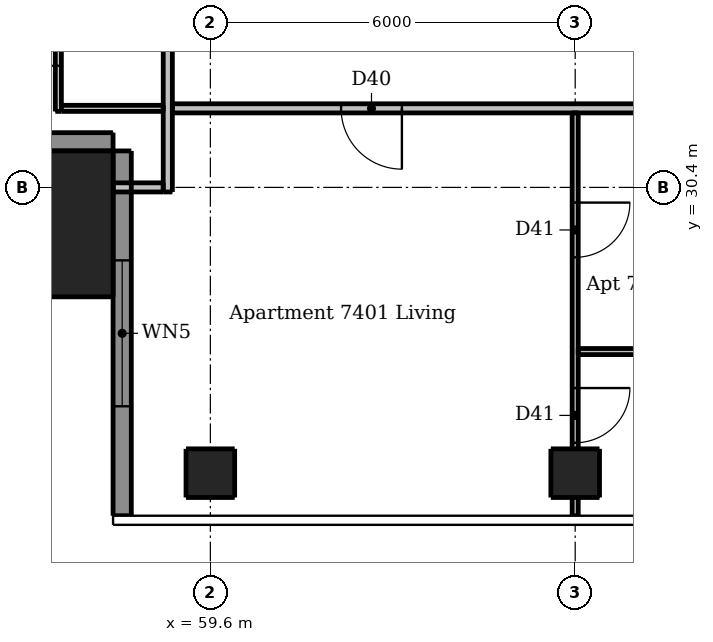
"""IFC4 building model, lengths in metres.
Left out: names, types, materials, properties, quantities, classifications, styles, units other than length and angle.
Written with IfcOpenShell. Run it as: python <this file> out.ifc"""

import sys

from ifc_helpers import new_model, si_unit, direction, frame, frame_2d, origin, origin_2d, place, context, subcontext, project, spatial, rectangle, extrude, element, fill, save


model = new_model("IFC4")
c1 = context("Model", 3, precision=1e-05, world=origin(), true_north=direction((0.0, 1.0)))
c2 = subcontext(c1, "Body", "Model", "MODEL_VIEW")
j1 = project(units=[si_unit("LENGTHUNIT", "METRE"), si_unit("PLANEANGLEUNIT", "RADIAN")], contexts=[c1])
p1 = place(None, origin())
s1 = spatial("IfcSite", under=j1, at=p1, CompositionType="ELEMENT")
p2 = place(p1, origin())
s2 = spatial("IfcBuilding", under=s1, at=p2, CompositionType="ELEMENT")
p3 = place(p2, frame((0.0, 0.0, 275.2)))
s3 = spatial("IfcBuildingStorey", under=s2, at=p3, CompositionType="ELEMENT", Elevation=275.2)
for number, where, z_axis, x_axis in (
    (1, (59.6, 25.7, 0.0), (0.0, 0.0, 1.0), (1.0, 0.0, 0.0)),
    (2, (65.6, 25.7, 0.0), (0.0, 0.0, 1.0), (1.0, 0.0, 0.0)),
):
    element("IfcColumn", number, at=place(p3, frame(where, z_axis=z_axis, x_axis=x_axis)), inside=s3, PredefinedType="COLUMN", context=c2, shape_type="SweptSolid", body=[
        extrude(rectangle(XDim=0.8, YDim=0.8, at=origin_2d()), origin(), (0.0, 0.0, 1.0), 3.05),
    ])
p4 = place(p3, frame((56.8, 29.8, 0.0), z_axis=(0.0, 0.0, 1.0), x_axis=(1.0, 0.0, 0.0)))
e3 = element("IfcColumn", 3, at=p4, inside=s3, PredefinedType="COLUMN", context=c2, shape_type="SweptSolid", body=[
    extrude(rectangle(XDim=2.4, YDim=2.4, at=origin_2d()), origin(), (0.0, 0.0, 1.0), 3.3),
])
p5 = place(p3, frame((53.0, 31.15, 0.0), z_axis=(0.0, 0.0, 1.0), x_axis=(1.0, 0.0, 0.0)))
e4 = element("IfcWall", 4, at=p5, inside=s3, PredefinedType="SOLIDWALL", context=c2, shape_type="SweptSolid", body=[
    extrude(rectangle(XDim=5.0, YDim=0.3, at=frame_2d((2.5, 0.0))), origin(), (0.0, 0.0, 1.0), 3.05),
])
p6 = place(p3, frame((58.15, 31.0, 0.0), z_axis=(0.0, 0.0, 1.0), x_axis=(0.0, -1.0, 0.0)))
e5 = element("IfcWall", 5, at=p6, inside=s3, PredefinedType="SOLIDWALL", context=c2, shape_type="SweptSolid", body=[
    extrude(rectangle(XDim=6.0, YDim=0.3, at=frame_2d((3.0, 0.0))), origin(), (0.0, 0.0, 1.0), 3.05),
])
p7 = place(p6, frame((1.8, 0.0, 0.15)))
e6 = element("IfcOpeningElement", 6, at=p7, cuts=e5, PredefinedType="OPENING", context=c2, shape_type="SweptSolid", body=[
    extrude(rectangle(XDim=2.4, YDim=2.1, at=frame_2d((1.2, 1.05))), frame((0.0, 0.16, 0.0), z_axis=(0.0, -1.0, 0.0), x_axis=(1.0, 0.0, 0.0)), (0.0, 0.0, 1.0), 0.32),
])
p8 = place(p3, frame((57.1, 31.65, 0.0), z_axis=(0.0, 0.0, 1.0), x_axis=(0.0, 1.0, 0.0)))
e7 = element("IfcWall", 7, at=p8, inside=s3, PredefinedType="PARTITIONING", context=c2, shape_type="SweptSolid", body=[
    extrude(rectangle(XDim=16.675, YDim=0.1, at=frame_2d((8.337, 0.0))), origin(), (0.0, 0.0, 1.0), 3.05),
])
p9 = place(p8, frame((11.2, 0.0, 0.0)))
e8 = element("IfcOpeningElement", 8, at=p9, cuts=e7, PredefinedType="OPENING", context=c2, shape_type="SweptSolid", body=[
    extrude(rectangle(XDim=0.9, YDim=2.1, at=frame_2d((0.45, 1.05))), frame((0.0, 0.06, 0.0), z_axis=(0.0, -1.0, 0.0), x_axis=(1.0, 0.0, 0.0)), (0.0, 0.0, 1.0), 0.12),
])
p10 = place(p8, frame((15.1, 0.0, 0.0)))
e9 = element("IfcOpeningElement", 9, at=p10, cuts=e7, PredefinedType="OPENING", context=c2, shape_type="SweptSolid", body=[
    extrude(rectangle(XDim=0.9, YDim=2.1, at=frame_2d((0.45, 1.05))), frame((0.0, 0.06, 0.0), z_axis=(0.0, -1.0, 0.0), x_axis=(1.0, 0.0, 0.0)), (0.0, 0.0, 1.0), 0.12),
])
p11 = place(p8, frame((13.0, 0.0, 0.0)))
e10 = element("IfcOpeningElement", 10, at=p11, cuts=e7, PredefinedType="OPENING", context=c2, shape_type="SweptSolid", body=[
    extrude(rectangle(XDim=0.9, YDim=2.1, at=frame_2d((0.45, 1.05))), frame((0.0, 0.06, 0.0), z_axis=(0.0, -1.0, 0.0), x_axis=(1.0, 0.0, 0.0)), (0.0, 0.0, 1.0), 0.12),
])
p12 = place(p8, frame((0.75, 0.0, 0.0)))
e11 = element("IfcOpeningElement", 11, at=p12, cuts=e7, PredefinedType="OPENING", context=c2, shape_type="SweptSolid", body=[
    extrude(rectangle(XDim=0.9, YDim=2.1, at=frame_2d((0.45, 1.05))), frame((0.0, 0.06, 0.0), z_axis=(0.0, -1.0, 0.0), x_axis=(1.0, 0.0, 0.0)), (0.0, 0.0, 1.0), 0.12),
])
p13 = place(p8, frame((6.1, 0.0, 0.0)))
e12 = element("IfcOpeningElement", 12, at=p13, cuts=e7, PredefinedType="OPENING", context=c2, shape_type="SweptSolid", body=[
    extrude(rectangle(XDim=0.9, YDim=2.1, at=frame_2d((0.45, 1.05))), frame((0.0, 0.06, 0.0), z_axis=(0.0, -1.0, 0.0), x_axis=(1.0, 0.0, 0.0)), (0.0, 0.0, 1.0), 0.12),
])
p14 = place(p8, frame((3.15, 0.0, 0.0)))
e13 = element("IfcOpeningElement", 13, at=p14, cuts=e7, PredefinedType="OPENING", context=c2, shape_type="SweptSolid", body=[
    extrude(rectangle(XDim=0.8, YDim=2.1, at=frame_2d((0.4, 1.05))), frame((0.0, 0.06, 0.0), z_axis=(0.0, -1.0, 0.0), x_axis=(1.0, 0.0, 0.0)), (0.0, 0.0, 1.0), 0.12),
])
p15 = place(p8, frame((9.15, 0.0, 0.0)))
e14 = element("IfcOpeningElement", 14, at=p15, cuts=e7, PredefinedType="OPENING", context=c2, shape_type="SweptSolid", body=[
    extrude(rectangle(XDim=0.8, YDim=2.1, at=frame_2d((0.4, 1.05))), frame((0.0, 0.06, 0.0), z_axis=(0.0, -1.0, 0.0), x_axis=(1.0, 0.0, 0.0)), (0.0, 0.0, 1.0), 0.12),
])
p16 = place(p3, frame((65.6, 31.625, 0.0), z_axis=(0.0, 0.0, 1.0), x_axis=(0.0, -1.0, 0.0)))
e15 = element("IfcWall", 15, at=p16, inside=s3, PredefinedType="PARTITIONING", context=c2, shape_type="SweptSolid", body=[
    extrude(rectangle(XDim=6.625, YDim=0.1, at=frame_2d((3.312, 0.0))), origin(), (0.0, 0.0, 1.0), 2.589),
])
p17 = place(p16, frame((1.475, 0.0, 0.0)))
e16 = element("IfcOpeningElement", 16, at=p17, cuts=e15, PredefinedType="OPENING", context=c2, shape_type="SweptSolid", body=[
    extrude(rectangle(XDim=0.9, YDim=2.1, at=frame_2d((0.45, 1.05))), frame((0.0, 0.06, 0.0), z_axis=(0.0, -1.0, 0.0), x_axis=(1.0, 0.0, 0.0)), (0.0, 0.0, 1.0), 0.12),
])
p18 = place(p16, frame((4.525, 0.0, 0.0)))
e17 = element("IfcOpeningElement", 17, at=p18, cuts=e15, PredefinedType="OPENING", context=c2, shape_type="SweptSolid", body=[
    extrude(rectangle(XDim=0.9, YDim=2.1, at=frame_2d((0.45, 1.05))), frame((0.0, 0.06, 0.0), z_axis=(0.0, -1.0, 0.0), x_axis=(1.0, 0.0, 0.0)), (0.0, 0.0, 1.0), 0.12),
])
p19 = place(p3, frame((57.15, 31.7, 0.0), z_axis=(0.0, 0.0, 1.0), x_axis=(1.0, 0.0, 0.0)))
e18 = element("IfcWall", 18, at=p19, inside=s3, PredefinedType="PARTITIONING", context=c2, shape_type="SweptSolid", body=[
    extrude(rectangle(XDim=1.675, YDim=0.1, at=frame_2d((0.837, 0.0))), origin(), (0.0, 0.0, 1.0), 3.05),
])
p20 = place(p3, frame((65.65, 27.7, 0.0), z_axis=(0.0, 0.0, 1.0), x_axis=(1.0, 0.0, 0.0)))
e19 = element("IfcWall", 19, at=p20, inside=s3, PredefinedType="PARTITIONING", context=c2, shape_type="SweptSolid", body=[
    extrude(rectangle(XDim=5.875, YDim=0.1, at=frame_2d((2.938, 0.0))), origin(), (0.0, 0.0, 1.0), 3.05),
])
p21 = place(p20, frame((3.75, 0.0, 0.0)))
e20 = element("IfcOpeningElement", 20, at=p21, cuts=e19, PredefinedType="OPENING", context=c2, shape_type="SweptSolid", body=[
    extrude(rectangle(XDim=0.8, YDim=2.1, at=frame_2d((0.4, 1.05))), frame((0.0, 0.06, 0.0), z_axis=(0.0, -1.0, 0.0), x_axis=(1.0, 0.0, 0.0)), (0.0, 0.0, 1.0), 0.12),
])
p22 = place(p3, frame((58.9, 30.325, 0.0), z_axis=(0.0, 0.0, 1.0), x_axis=(0.0, 1.0, 0.0)))
e21 = element("IfcWall", 21, at=p22, inside=s3, PredefinedType="PARTITIONING", context=c2, shape_type="SweptSolid", body=[
    extrude(rectangle(XDim=30.85, YDim=0.15, at=frame_2d((15.425, 0.0))), origin(), (0.0, 0.0, 1.0), 3.05),
])
p23 = place(p22, frame((9.225, 0.0, 0.0)))
e22 = element("IfcOpeningElement", 22, at=p23, cuts=e21, PredefinedType="OPENING", context=c2, shape_type="SweptSolid", body=[
    extrude(rectangle(XDim=1.0, YDim=2.1, at=frame_2d((0.5, 1.05))), frame((0.0, 0.085, 0.0), z_axis=(0.0, -1.0, 0.0), x_axis=(1.0, 0.0, 0.0)), (0.0, 0.0, 1.0), 0.17),
])
p24 = place(p22, frame((26.925, 0.0, 0.0)))
e23 = element("IfcOpeningElement", 23, at=p24, cuts=e21, PredefinedType="OPENING", context=c2, shape_type="SweptSolid", body=[
    extrude(rectangle(XDim=1.0, YDim=2.1, at=frame_2d((0.5, 1.05))), frame((0.0, 0.085, 0.0), z_axis=(0.0, -1.0, 0.0), x_axis=(1.0, 0.0, 0.0)), (0.0, 0.0, 1.0), 0.17),
])
p25 = place(p3, frame((89.525, 31.7, 0.0), z_axis=(0.0, 0.0, 1.0), x_axis=(-1.0, 0.0, 0.0)))
e24 = element("IfcWall", 24, at=p25, inside=s3, PredefinedType="PARTITIONING", context=c2, shape_type="SweptSolid", body=[
    extrude(rectangle(XDim=30.55, YDim=0.15, at=frame_2d((15.275, 0.0))), origin(), (0.0, 0.0, 1.0), 3.05),
])
p26 = place(p25, frame((26.775, 0.0, 0.0)))
e25 = element("IfcOpeningElement", 25, at=p26, cuts=e24, PredefinedType="OPENING", context=c2, shape_type="SweptSolid", body=[
    extrude(rectangle(XDim=1.0, YDim=2.1, at=frame_2d((0.5, 1.05))), frame((0.0, 0.085, 0.0), z_axis=(0.0, -1.0, 0.0), x_axis=(1.0, 0.0, 0.0)), (0.0, 0.0, 1.0), 0.17),
])
p27 = place(p25, frame((9.363, 0.0, 0.0)))
e26 = element("IfcOpeningElement", 26, at=p27, cuts=e24, PredefinedType="OPENING", context=c2, shape_type="SweptSolid", body=[
    extrude(rectangle(XDim=1.0, YDim=2.1, at=frame_2d((0.5, 1.05))), frame((0.0, 0.085, 0.0), z_axis=(0.0, -1.0, 0.0), x_axis=(1.0, 0.0, 0.0)), (0.0, 0.0, 1.0), 0.17),
])
p28 = place(p3, frame((58.0, 30.4, 0.0), z_axis=(0.0, 0.0, 1.0), x_axis=(1.0, 0.0, 0.0)))
e27 = element("IfcWall", 27, at=p28, inside=s3, PredefinedType="PARTITIONING", context=c2, shape_type="SweptSolid", body=[
    extrude(rectangle(XDim=0.825, YDim=0.15, at=frame_2d((0.413, 0.0))), origin(), (0.0, 0.0, 1.0), 3.05),
])
p29 = place(p7, origin())
e28 = element("IfcWindow", 28, at=p29, inside=s3, PartitioningType="DOUBLE_PANEL_VERTICAL", PredefinedType="WINDOW", context=c2, shape_type="SweptSolid", body=[
    extrude(rectangle(XDim=2.4, YDim=2.1, at=frame_2d((1.2, 1.05))), frame((0.0, 0.03, 0.0), z_axis=(0.0, -1.0, 0.0), x_axis=(1.0, 0.0, 0.0)), (0.0, 0.0, 1.0), 0.06),
])
fill(e6, e28)
p30 = place(p26, origin())
e29 = element("IfcDoor", 29, at=p30, inside=s3, OperationType="SINGLE_SWING_LEFT", PredefinedType="DOOR", context=c2, shape_type="SweptSolid", body=[
    extrude(rectangle(XDim=1.0, YDim=2.1, at=frame_2d((0.5, 1.05))), frame((0.0, 0.025, 0.0), z_axis=(0.0, -1.0, 0.0), x_axis=(1.0, 0.0, 0.0)), (0.0, 0.0, 1.0), 0.05),
])
fill(e25, e29)
p31 = place(p17, origin())
e30 = element("IfcDoor", 30, at=p31, inside=s3, OperationType="SINGLE_SWING_LEFT", PredefinedType="DOOR", context=c2, shape_type="SweptSolid", body=[
    extrude(rectangle(XDim=0.9, YDim=2.1, at=frame_2d((0.45, 1.05))), frame((0.0, 0.025, 0.0), z_axis=(0.0, -1.0, 0.0), x_axis=(1.0, 0.0, 0.0)), (0.0, 0.0, 1.0), 0.05),
])
fill(e16, e30)
p32 = place(p18, origin())
e31 = element("IfcDoor", 31, at=p32, inside=s3, OperationType="SINGLE_SWING_LEFT", PredefinedType="DOOR", context=c2, shape_type="SweptSolid", body=[
    extrude(rectangle(XDim=0.9, YDim=2.1, at=frame_2d((0.45, 1.05))), frame((0.0, 0.025, 0.0), z_axis=(0.0, -1.0, 0.0), x_axis=(1.0, 0.0, 0.0)), (0.0, 0.0, 1.0), 0.05),
])
fill(e17, e31)
p33 = place(p12, origin())
e32 = element("IfcDoor", 32, at=p33, inside=s3, OperationType="SINGLE_SWING_LEFT", PredefinedType="DOOR", context=c2, shape_type="SweptSolid", body=[
    extrude(rectangle(XDim=0.9, YDim=2.1, at=frame_2d((0.45, 1.05))), frame((0.0, 0.025, 0.0), z_axis=(0.0, -1.0, 0.0), x_axis=(1.0, 0.0, 0.0)), (0.0, 0.0, 1.0), 0.05),
])
fill(e11, e32)
save(model, sys.argv[1])
